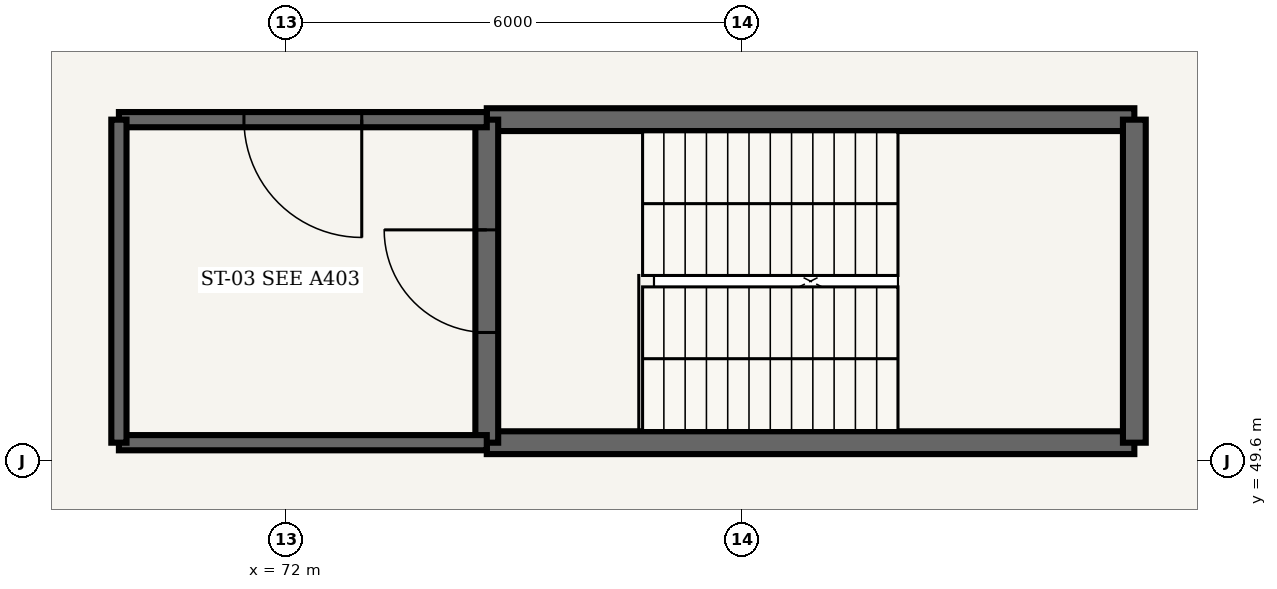
"""IFC4 building model, lengths in metres.
Left out: names, types, materials, properties, quantities, classifications, styles, units other than length and angle.
Written with IfcOpenShell. Run it as: python <this file> out.ifc"""

import sys

from ifc_helpers import new_model, si_unit, direction, frame, frame_2d, origin, place, context, subcontext, project, spatial, rectangle, extrude, element, fill, save


model = new_model("IFC4")
c1 = context("Model", 3, precision=1e-05, world=origin(), true_north=direction((0.0, 1.0)))
c2 = subcontext(c1, "Body", "Model", "MODEL_VIEW")
j1 = project(units=[si_unit("LENGTHUNIT", "METRE"), si_unit("PLANEANGLEUNIT", "RADIAN")], contexts=[c1])
p1 = place(None, origin())
s1 = spatial("IfcSite", under=j1, at=p1, CompositionType="ELEMENT")
p2 = place(p1, origin())
s2 = spatial("IfcBuilding", under=s1, at=p2, CompositionType="ELEMENT")
p3 = place(p2, frame((0.0, 0.0, 20.4)))
s3 = spatial("IfcBuildingStorey", under=s2, at=p3, CompositionType="ELEMENT", Elevation=20.4)
for number, where, z_axis, x_axis in (
    (1, (74.64, 49.84, 0.0), (0.0, 0.0, 1.0), (1.0, 0.0, 0.0)),
    (2, (83.16, 54.09, 0.0), (0.0, 0.0, 1.0), (-1.0, 0.0, 0.0)),
):
    element("IfcWall", number, at=place(p3, frame(where, z_axis=z_axis, x_axis=x_axis)), inside=s3, PredefinedType="SHEAR", context=c2, shape_type="SweptSolid", body=[
        extrude(rectangle(XDim=8.52, YDim=0.3, at=frame_2d((4.26, 0.0))), origin(), (0.0, 0.0, 1.0), 3.65),
    ])
p4 = place(p3, frame((74.64, 54.09, 0.0), z_axis=(0.0, 0.0, 1.0), x_axis=(0.0, -1.0, 0.0)))
e3 = element("IfcWall", 3, at=p4, inside=s3, PredefinedType="SHEAR", context=c2, shape_type="SweptSolid", body=[
    extrude(rectangle(XDim=4.25, YDim=0.3, at=frame_2d((2.125, 0.0))), origin(), (0.0, 0.0, 1.0), 3.65),
])
p5 = place(p4, frame((1.45, 0.0, 0.0)))
e4 = element("IfcOpeningElement", 4, at=p5, cuts=e3, PredefinedType="OPENING", context=c2, shape_type="SweptSolid", body=[
    extrude(rectangle(XDim=1.35, YDim=2.2, at=frame_2d((0.675, 1.1))), frame((0.0, 0.16, 0.0), z_axis=(0.0, -1.0, 0.0), x_axis=(1.0, 0.0, 0.0)), (0.0, 0.0, 1.0), 0.32),
])
p6 = place(p3, frame((83.16, 49.84, 0.0), z_axis=(0.0, 0.0, 1.0), x_axis=(0.0, 1.0, 0.0)))
e5 = element("IfcWall", 5, at=p6, inside=s3, PredefinedType="SHEAR", context=c2, shape_type="SweptSolid", body=[
    extrude(rectangle(XDim=4.25, YDim=0.3, at=frame_2d((2.125, 0.0))), origin(), (0.0, 0.0, 1.0), 3.65),
])
p7 = place(p3, frame((69.8, 49.84, 0.0), z_axis=(0.0, 0.0, 1.0), x_axis=(1.0, 0.0, 0.0)))
e6 = element("IfcWall", 6, at=p7, inside=s3, PredefinedType="SHEAR", context=c2, shape_type="SweptSolid", body=[
    extrude(rectangle(XDim=4.84, YDim=0.2, at=frame_2d((2.42, 0.0))), origin(), (0.0, 0.0, 1.0), 3.65),
])
p8 = place(p3, frame((74.64, 54.09, 0.0), z_axis=(0.0, 0.0, 1.0), x_axis=(-1.0, 0.0, 0.0)))
e7 = element("IfcWall", 7, at=p8, inside=s3, PredefinedType="SHEAR", context=c2, shape_type="SweptSolid", body=[
    extrude(rectangle(XDim=4.84, YDim=0.2, at=frame_2d((2.42, 0.0))), origin(), (0.0, 0.0, 1.0), 3.65),
])
p9 = place(p8, frame((1.645, 0.0, 0.0)))
e8 = element("IfcOpeningElement", 8, at=p9, cuts=e7, PredefinedType="OPENING", context=c2, shape_type="SweptSolid", body=[
    extrude(rectangle(XDim=1.55, YDim=2.2, at=frame_2d((0.775, 1.1))), frame((0.0, 0.11, 0.0), z_axis=(0.0, -1.0, 0.0), x_axis=(1.0, 0.0, 0.0)), (0.0, 0.0, 1.0), 0.22),
])
p10 = place(p3, frame((69.8, 54.09, 0.0), z_axis=(0.0, 0.0, 1.0), x_axis=(0.0, -1.0, 0.0)))
e9 = element("IfcWall", 9, at=p10, inside=s3, PredefinedType="SHEAR", context=c2, shape_type="SweptSolid", body=[
    extrude(rectangle(XDim=4.25, YDim=0.2, at=frame_2d((2.125, 0.0))), origin(), (0.0, 0.0, 1.0), 3.65),
])
p11 = place(p5, origin())
e10 = element("IfcDoor", 10, at=p11, inside=s3, OperationType="SINGLE_SWING_RIGHT", PredefinedType="DOOR", context=c2, shape_type="SweptSolid", body=[
    extrude(rectangle(XDim=1.35, YDim=2.2, at=frame_2d((0.675, 1.1))), frame((0.0, 0.025, 0.0), z_axis=(0.0, -1.0, 0.0), x_axis=(1.0, 0.0, 0.0)), (0.0, 0.0, 1.0), 0.05),
])
fill(e4, e10)
p12 = place(p9, origin())
e11 = element("IfcDoor", 11, at=p12, inside=s3, OperationType="SINGLE_SWING_LEFT", PredefinedType="DOOR", context=c2, shape_type="SweptSolid", body=[
    extrude(rectangle(XDim=1.55, YDim=2.2, at=frame_2d((0.775, 1.1))), frame((0.0, 0.025, 0.0), z_axis=(0.0, -1.0, 0.0), x_axis=(1.0, 0.0, 0.0)), (0.0, 0.0, 1.0), 0.05),
])
fill(e8, e11)
save(model, sys.argv[1])
